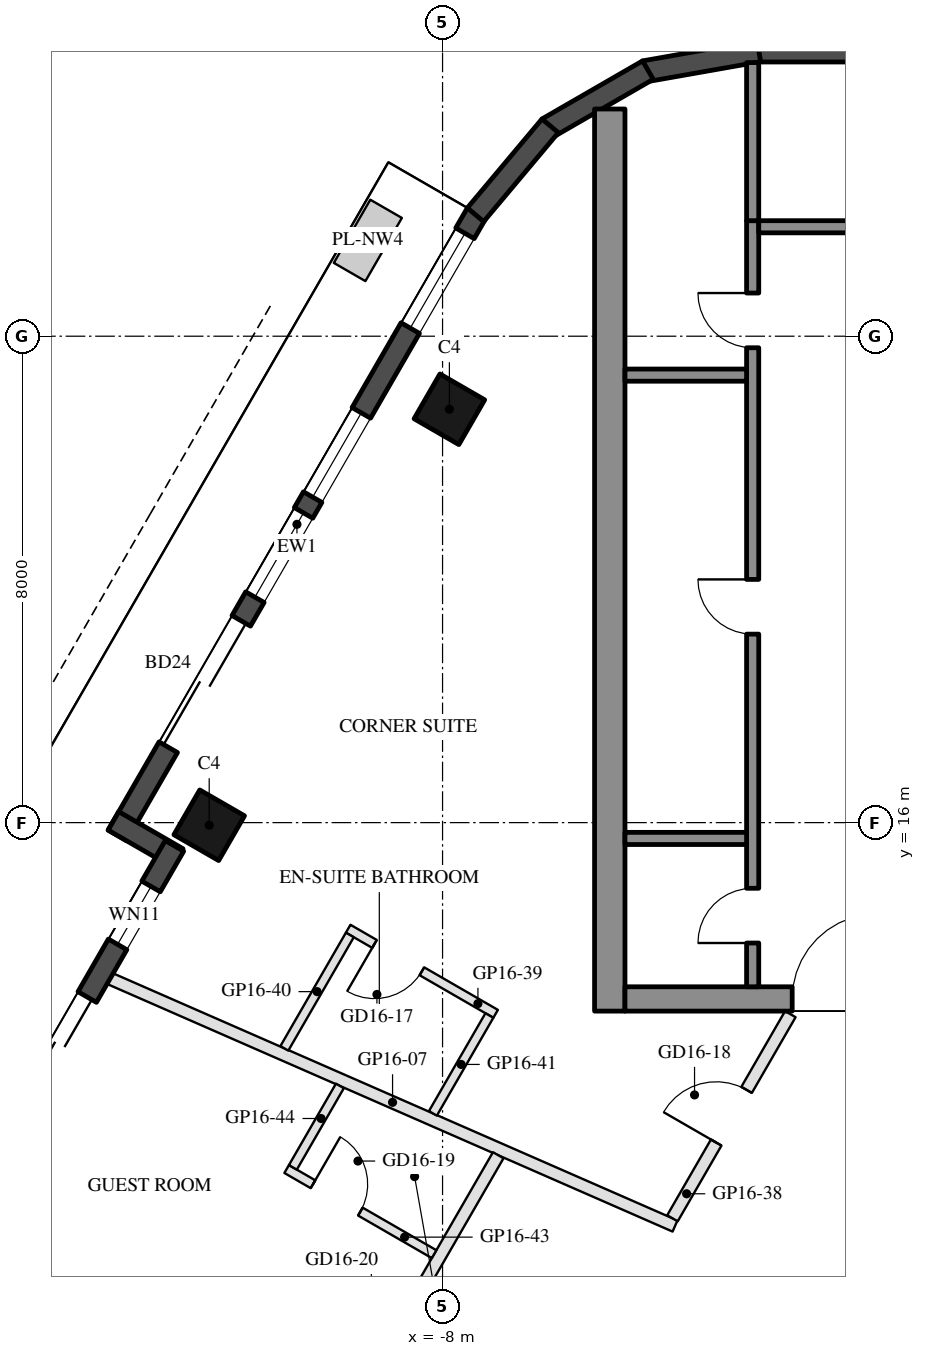
"""IFC4 building model, lengths in metres.
Left out: names, types, materials, properties, quantities, classifications, styles, units other than length and angle.
Written with IfcOpenShell. Run it as: python <this file> out.ifc"""

import sys

from ifc_helpers import new_model, si_unit, direction, frame, frame_2d, origin, origin_2d, place, context, subcontext, project, spatial, rectangle, hollow_rectangle, extrude, element, fill, save


model = new_model("IFC4")
c1 = context("Model", 3, precision=1e-05, world=origin(), true_north=direction((0.0, 1.0)))
c2 = subcontext(c1, "Body", "Model", "MODEL_VIEW")
j1 = project(units=[si_unit("LENGTHUNIT", "METRE"), si_unit("PLANEANGLEUNIT", "RADIAN")], contexts=[c1])
p1 = place(None, origin())
s1 = spatial("IfcSite", under=j1, at=p1, CompositionType="ELEMENT")
p2 = place(p1, origin())
s2 = spatial("IfcBuilding", under=s1, at=p2, CompositionType="ELEMENT")
p3 = place(p2, frame((0.0, 0.0, 176.2)))
s3 = spatial("IfcBuildingStorey", under=s2, at=p3, CompositionType="ELEMENT", Elevation=176.2)
for number, where, z_axis, x_axis in (
    (1, (-7.888, 22.798, 0.0), (0.0, 0.0, 1.0), (0.5, 0.866, 0.0)),
    (2, (-11.838, 15.957, 0.0), (0.0, 0.0, 1.0), (0.5, 0.866, 0.0)),
):
    element("IfcColumn", number, at=place(p3, frame(where, z_axis=z_axis, x_axis=x_axis)), inside=s3, PredefinedType="COLUMN", context=c2, shape_type="SweptSolid", body=[
        extrude(hollow_rectangle(XDim=0.85, YDim=0.85, WallThickness=0.04, at=origin_2d()), origin(), (0.0, 0.0, 1.0), 3.7),
    ])
p4 = place(p3, frame((-7.441, 26.022, 0.0), z_axis=(0.0, 0.0, 1.0), x_axis=(-0.499992533062, -0.86602971478, 0.0)))
e3 = element("IfcWall", 3, at=p4, inside=s3, PredefinedType="SOLIDWALL", context=c2, shape_type="SweptSolid", body=[
    extrude(rectangle(XDim=11.816, YDim=0.35, at=frame_2d((5.908, 0.0))), origin(), (0.0, 0.0, 1.0), 3.55),
])
p5 = place(p4, frame((0.381, 0.0, 0.3)))
e4 = element("IfcOpeningElement", 4, at=p5, cuts=e3, PredefinedType="OPENING", context=c2, shape_type="SweptSolid", body=[
    extrude(rectangle(XDim=1.8, YDim=2.65, at=frame_2d((0.9, 1.325))), frame((0.0, 0.185, 0.0), z_axis=(0.0, -1.0, 0.0), x_axis=(1.0, 0.0, 0.0)), (0.0, 0.0, 1.0), 0.37),
])
p6 = place(p4, frame((7.74, 0.0, 0.0)))
e5 = element("IfcOpeningElement", 5, at=p6, cuts=e3, PredefinedType="OPENING", context=c2, shape_type="SweptSolid", body=[
    extrude(rectangle(XDim=2.4, YDim=2.4, at=frame_2d((1.2, 1.2))), frame((0.0, 0.185, 0.0), z_axis=(0.0, -1.0, 0.0), x_axis=(1.0, 0.0, 0.0)), (0.0, 0.0, 1.0), 0.37),
])
p7 = place(p4, frame((3.791, 0.0, 0.3)))
e6 = element("IfcOpeningElement", 6, at=p7, cuts=e3, PredefinedType="OPENING", context=c2, shape_type="SweptSolid", body=[
    extrude(rectangle(XDim=1.6, YDim=2.65, at=frame_2d((0.8, 1.325))), frame((0.0, 0.185, 0.0), z_axis=(0.0, -1.0, 0.0), x_axis=(1.0, 0.0, 0.0)), (0.0, 0.0, 1.0), 0.37),
])
p8 = place(p4, frame((5.691, 0.0, 0.3)))
e7 = element("IfcOpeningElement", 7, at=p8, cuts=e3, PredefinedType="OPENING", context=c2, shape_type="SweptSolid", body=[
    extrude(rectangle(XDim=1.6, YDim=2.65, at=frame_2d((0.8, 1.325))), frame((0.0, 0.185, 0.0), z_axis=(0.0, -1.0, 0.0), x_axis=(1.0, 0.0, 0.0)), (0.0, 0.0, 1.0), 0.37),
])
p9 = place(p3, frame((-13.413, 16.029, 0.0), z_axis=(0.0, 0.0, 1.0), x_axis=(0.866005645448, -0.500034220881, 0.0)))
e8 = element("IfcWall", 8, at=p9, inside=s3, PredefinedType="SOLIDWALL", context=c2, shape_type="SweptSolid", body=[
    extrude(rectangle(XDim=1.22, YDim=0.35, at=frame_2d((0.61, 0.0))), origin(), (0.0, 0.0, 1.0), 3.55),
])
p10 = place(p3, frame((-12.409, 15.617, 0.0), z_axis=(0.0, 0.0, 1.0), x_axis=(-0.500003597184, -0.866023326939, 0.0)))
e9 = element("IfcWall", 9, at=p10, inside=s3, PredefinedType="SOLIDWALL", context=c2, shape_type="SweptSolid", body=[
    extrude(rectangle(XDim=6.74, YDim=0.35, at=frame_2d((3.37, 0.0))), origin(), (0.0, 0.0, 1.0), 3.55),
])
p11 = place(p10, frame((0.77, 0.0, 0.3)))
e10 = element("IfcOpeningElement", 10, at=p11, cuts=e9, PredefinedType="OPENING", context=c2, shape_type="SweptSolid", body=[
    extrude(rectangle(XDim=1.1, YDim=2.65, at=frame_2d((0.55, 1.325))), frame((0.0, 0.185, 0.0), z_axis=(0.0, -1.0, 0.0), x_axis=(1.0, 0.0, 0.0)), (0.0, 0.0, 1.0), 0.37),
])
p12 = place(p10, frame((2.87, 0.0, 0.0)))
e11 = element("IfcOpeningElement", 11, at=p12, cuts=e9, PredefinedType="OPENING", context=c2, shape_type="SweptSolid", body=[
    extrude(rectangle(XDim=1.8, YDim=2.4, at=frame_2d((0.9, 1.2))), frame((0.0, 0.185, 0.0), z_axis=(0.0, -1.0, 0.0), x_axis=(1.0, 0.0, 0.0)), (0.0, 0.0, 1.0), 0.37),
])
p13 = place(p10, frame((4.97, 0.0, 0.3)))
e12 = element("IfcOpeningElement", 12, at=p13, cuts=e9, PredefinedType="OPENING", context=c2, shape_type="SweptSolid", body=[
    extrude(rectangle(XDim=1.0, YDim=2.65, at=frame_2d((0.5, 1.325))), frame((0.0, 0.185, 0.0), z_axis=(0.0, -1.0, 0.0), x_axis=(1.0, 0.0, 0.0)), (0.0, 0.0, 1.0), 0.37),
])
p14 = place(p3, frame((2.829, 28.685, 0.0), z_axis=(0.0, 0.0, 1.0), x_axis=(-1.0, 0.0, 0.0)))
e13 = element("IfcWall", 13, at=p14, inside=s3, PredefinedType="SOLIDWALL", context=c2, shape_type="SweptSolid", body=[
    extrude(rectangle(XDim=5.658, YDim=0.35, at=frame_2d((2.829, 0.0))), origin(), (0.0, 0.0, 1.0), 3.55),
])
for number, where, z_axis, x_axis in (
    (14, (-2.799, 28.688, 0.0), (0.0, 0.0, 1.0), (-0.985, -0.174, 0.0)),
    (15, (-4.623, 28.377, 0.0), (0.0, 0.0, 1.0), (-0.866, -0.5, 0.0)),
):
    element("IfcWall", number, at=place(p3, frame(where, z_axis=z_axis, x_axis=x_axis)), inside=s3, PredefinedType="SOLIDWALL", context=c2, shape_type="SweptSolid", body=[
        extrude(rectangle(XDim=1.91, YDim=0.35, at=frame_2d((0.955, 0.0))), origin(), (0.0, 0.0, 1.0), 3.55),
    ])
p15 = place(p3, frame((-6.23, 27.461, 0.0), z_axis=(0.0, 0.0, 1.0), x_axis=(-0.642808304945, -0.766027077259, 0.0)))
e16 = element("IfcWall", 16, at=p15, inside=s3, PredefinedType="SOLIDWALL", context=c2, shape_type="SweptSolid", body=[
    extrude(rectangle(XDim=1.91, YDim=0.35, at=frame_2d((0.955, 0.0))), origin(), (0.0, 0.0, 1.0), 3.55),
])
p16 = place(p3, frame((-5.25, 12.9, 0.0), z_axis=(0.0, 0.0, 1.0), x_axis=(0.0, 1.0, 0.0)))
e17 = element("IfcWall", 17, at=p16, inside=s3, PredefinedType="SHEAR", context=c2, shape_type="SweptSolid", body=[
    extrude(rectangle(XDim=14.837, YDim=0.5, at=frame_2d((7.418, 0.0))), origin(), (0.0, 0.0, 1.0), 3.5),
])
p17 = place(p3, frame((5.0, 13.1, 0.0), z_axis=(0.0, 0.0, 1.0), x_axis=(-1.0, 0.0, 0.0)))
e18 = element("IfcWall", 18, at=p17, inside=s3, PredefinedType="SHEAR", context=c2, shape_type="SweptSolid", body=[
    extrude(rectangle(XDim=10.0, YDim=0.4, at=frame_2d((5.0, 0.0))), origin(), (0.0, 0.0, 1.0), 3.5),
])
p18 = place(p17, frame((3.55, 0.0, 0.0)))
e19 = element("IfcOpeningElement", 19, at=p18, cuts=e18, PredefinedType="OPENING", context=c2, shape_type="SweptSolid", body=[
    extrude(rectangle(XDim=1.1, YDim=2.1, at=frame_2d((0.55, 1.05))), frame((0.0, 0.21, 0.0), z_axis=(0.0, -1.0, 0.0), x_axis=(1.0, 0.0, 0.0)), (0.0, 0.0, 1.0), 0.42),
])
p19 = place(p17, frame((5.85, 0.0, 0.0)))
e20 = element("IfcOpeningElement", 20, at=p19, cuts=e18, PredefinedType="OPENING", context=c2, shape_type="SweptSolid", body=[
    extrude(rectangle(XDim=1.4, YDim=2.1, at=frame_2d((0.7, 1.05))), frame((0.0, 0.21, 0.0), z_axis=(0.0, -1.0, 0.0), x_axis=(1.0, 0.0, 0.0)), (0.0, 0.0, 1.0), 0.42),
])
p20 = place(p3, frame((-2.9, 13.3, 0.0), z_axis=(0.0, 0.0, 1.0), x_axis=(0.0, 1.0, 0.0)))
e21 = element("IfcWall", 21, at=p20, inside=s3, PredefinedType="SHEAR", context=c2, shape_type="SweptSolid", body=[
    extrude(rectangle(XDim=12.6, YDim=0.2, at=frame_2d((6.3, 0.0))), origin(), (0.0, 0.0, 1.0), 3.5),
])
p21 = place(p20, frame((0.72, 0.0, 0.0)))
e22 = element("IfcOpeningElement", 22, at=p21, cuts=e21, PredefinedType="OPENING", context=c2, shape_type="SweptSolid", body=[
    extrude(rectangle(XDim=0.9, YDim=2.1, at=frame_2d((0.45, 1.05))), frame((0.0, 0.11, 0.0), z_axis=(0.0, -1.0, 0.0), x_axis=(1.0, 0.0, 0.0)), (0.0, 0.0, 1.0), 0.22),
])
p22 = place(p20, frame((5.8, 0.0, 0.0)))
e23 = element("IfcOpeningElement", 23, at=p22, cuts=e21, PredefinedType="OPENING", context=c2, shape_type="SweptSolid", body=[
    extrude(rectangle(XDim=0.9, YDim=2.1, at=frame_2d((0.45, 1.05))), frame((0.0, 0.11, 0.0), z_axis=(0.0, -1.0, 0.0), x_axis=(1.0, 0.0, 0.0)), (0.0, 0.0, 1.0), 0.22),
])
p23 = place(p20, frame((10.51, 0.0, 0.0)))
e24 = element("IfcOpeningElement", 24, at=p23, cuts=e21, PredefinedType="OPENING", context=c2, shape_type="SweptSolid", body=[
    extrude(rectangle(XDim=0.9, YDim=2.1, at=frame_2d((0.45, 1.05))), frame((0.0, 0.11, 0.0), z_axis=(0.0, -1.0, 0.0), x_axis=(1.0, 0.0, 0.0)), (0.0, 0.0, 1.0), 0.22),
])
p24 = place(p3, frame((-0.4, 25.8, 0.0), z_axis=(0.0, 0.0, 1.0), x_axis=(-1.0, 0.0, 0.0)))
e25 = element("IfcWall", 25, at=p24, inside=s3, PredefinedType="SHEAR", context=c2, shape_type="SweptSolid", body=[
    extrude(rectangle(XDim=2.4, YDim=0.2, at=frame_2d((1.2, 0.0))), origin(), (0.0, 0.0, 1.0), 3.5),
])
for number, where, z_axis, x_axis in (
    (26, (-3.0, 15.74, 0.0), (0.0, 0.0, 1.0), (-1.0, 0.0, 0.0)),
    (27, (-3.0, 23.36, 0.0), (0.0, 0.0, 1.0), (-1.0, 0.0, 0.0)),
):
    element("IfcWall", number, at=place(p3, frame(where, z_axis=z_axis, x_axis=x_axis)), inside=s3, PredefinedType="SHEAR", context=c2, shape_type="SweptSolid", body=[
        extrude(rectangle(XDim=2.0, YDim=0.2, at=frame_2d((1.0, 0.0))), origin(), (0.0, 0.0, 1.0), 3.5),
    ])
p25 = place(p3, frame((-2.9, 25.9, 0.0), z_axis=(0.0, 0.0, 1.0), x_axis=(0.0, 1.0, 0.0)))
e28 = element("IfcWall", 28, at=p25, inside=s3, PredefinedType="SHEAR", context=c2, shape_type="SweptSolid", body=[
    extrude(rectangle(XDim=2.6, YDim=0.2, at=frame_2d((1.3, 0.0))), origin(), (0.0, 0.0, 1.0), 3.5),
])
p26 = place(p3, frame((-13.467, 13.434, 0.0), z_axis=(0.0, 0.0, 1.0), x_axis=(0.916026348045, -0.401118099426, 0.0)))
e29 = element("IfcWall", 29, at=p26, inside=s3, PredefinedType="PARTITIONING", context=c2, shape_type="SweptSolid", body=[
    extrude(rectangle(XDim=10.142, YDim=0.2, at=frame_2d((5.071, 0.0))), origin(), (0.0, 0.0, 1.0), 3.06),
])
p27 = place(p3, frame((-15.44, 8.867, 0.0), z_axis=(0.0, 0.0, 1.0), x_axis=(0.851787104886, -0.523888087237, 0.0)))
e30 = element("IfcWall", 30, at=p27, inside=s3, PredefinedType="PARTITIONING", context=c2, shape_type="SweptSolid", body=[
    extrude(rectangle(XDim=6.508, YDim=0.2, at=frame_2d((3.254, 0.0))), origin(), (0.0, 0.0, 1.0), 2.95),
])
p28 = place(p3, frame((-4.219, 9.493, 0.0), z_axis=(0.0, 0.0, 1.0), x_axis=(0.499993219391, 0.866029318535, 0.0)))
e31 = element("IfcWall", 31, at=p28, inside=s3, PredefinedType="PARTITIONING", context=c2, shape_type="SweptSolid", body=[
    extrude(rectangle(XDim=3.876, YDim=0.2, at=frame_2d((1.938, 0.0))), origin(), (0.0, 0.0, 1.0), 2.95),
])
p29 = place(p28, frame((1.438, 0.0, 0.0)))
e32 = element("IfcOpeningElement", 32, at=p29, cuts=e31, PredefinedType="OPENING", context=c2, shape_type="SweptSolid", body=[
    extrude(rectangle(XDim=1.0, YDim=2.1, at=frame_2d((0.5, 1.05))), frame((0.0, 0.11, 0.0), z_axis=(0.0, -1.0, 0.0), x_axis=(1.0, 0.0, 0.0)), (0.0, 0.0, 1.0), 0.22),
])
p30 = place(p3, frame((-7.127, 12.855, 0.0), z_axis=(0.0, 0.0, 1.0), x_axis=(-0.866018616679, 0.500011755427, 0.0)))
e33 = element("IfcWall", 33, at=p30, inside=s3, PredefinedType="PARTITIONING", context=c2, shape_type="SweptSolid", body=[
    extrude(rectangle(XDim=2.8, YDim=0.15, at=frame_2d((1.4, 0.0))), origin(), (0.0, 0.0, 1.0), 3.55),
])
p31 = place(p30, frame((1.4, 0.0, 0.0)))
e34 = element("IfcOpeningElement", 34, at=p31, cuts=e33, PredefinedType="OPENING", context=c2, shape_type="SweptSolid", body=[
    extrude(rectangle(XDim=0.9, YDim=2.1, at=frame_2d((0.45, 1.05))), frame((0.0, 0.085, 0.0), z_axis=(0.0, -1.0, 0.0), x_axis=(1.0, 0.0, 0.0)), (0.0, 0.0, 1.0), 0.17),
])
p32 = place(p3, frame((-9.525, 14.153, 0.0), z_axis=(0.0, 0.0, 1.0), x_axis=(-0.500016891966, -0.866015650984, 0.0)))
e35 = element("IfcWall", 35, at=p32, inside=s3, PredefinedType="PARTITIONING", context=c2, shape_type="SweptSolid", body=[
    extrude(rectangle(XDim=2.153, YDim=0.15, at=frame_2d((1.077, 0.0))), origin(), (0.0, 0.0, 1.0), 3.55),
])
p33 = place(p3, frame((-7.23, 12.828, 0.0), z_axis=(0.0, 0.0, 1.0), x_axis=(-0.500010545262, -0.866019315389, 0.0)))
e36 = element("IfcWall", 36, at=p33, inside=s3, PredefinedType="PARTITIONING", context=c2, shape_type="SweptSolid", body=[
    extrude(rectangle(XDim=1.858, YDim=0.15, at=frame_2d((0.929, 0.0))), origin(), (0.0, 0.0, 1.0), 3.55),
])
p34 = place(p3, frame((-9.932, 5.597, 0.0), z_axis=(0.0, 0.0, 1.0), x_axis=(0.500006916967, 0.866021410235, 0.0)))
e37 = element("IfcWall", 37, at=p34, inside=s3, PredefinedType="PARTITIONING", context=c2, shape_type="SweptSolid", body=[
    extrude(rectangle(XDim=5.696, YDim=0.2, at=frame_2d((2.848, 0.0))), origin(), (0.0, 0.0, 1.0), 2.95),
])
p35 = place(p34, frame((2.235, 0.0, 0.0)))
e38 = element("IfcOpeningElement", 38, at=p35, cuts=e37, PredefinedType="OPENING", context=c2, shape_type="SweptSolid", body=[
    extrude(rectangle(XDim=1.0, YDim=2.1, at=frame_2d((0.5, 1.05))), frame((0.0, 0.11, 0.0), z_axis=(0.0, -1.0, 0.0), x_axis=(1.0, 0.0, 0.0)), (0.0, 0.0, 1.0), 0.22),
])
p36 = place(p3, frame((-10.564, 10.303, 0.0), z_axis=(0.0, 0.0, 1.0), x_axis=(0.865996816683, -0.500049511043, 0.0)))
e39 = element("IfcWall", 39, at=p36, inside=s3, PredefinedType="PARTITIONING", context=c2, shape_type="SweptSolid", body=[
    extrude(rectangle(XDim=2.8, YDim=0.15, at=frame_2d((1.4, 0.0))), origin(), (0.0, 0.0, 1.0), 3.55),
])
p37 = place(p36, frame((0.5, 0.0, 0.0)))
e40 = element("IfcOpeningElement", 40, at=p37, cuts=e39, PredefinedType="OPENING", context=c2, shape_type="SweptSolid", body=[
    extrude(rectangle(XDim=0.9, YDim=2.1, at=frame_2d((0.45, 1.05))), frame((0.0, 0.085, 0.0), z_axis=(0.0, -1.0, 0.0), x_axis=(1.0, 0.0, 0.0)), (0.0, 0.0, 1.0), 0.17),
])
p38 = place(p3, frame((-9.688, 11.67, 0.0), z_axis=(0.0, 0.0, 1.0), x_axis=(-0.499890974144, -0.866088340742, 0.0)))
e41 = element("IfcWall", 41, at=p38, inside=s3, PredefinedType="PARTITIONING", context=c2, shape_type="SweptSolid", body=[
    extrude(rectangle(XDim=1.547, YDim=0.15, at=frame_2d((0.773, 0.0))), origin(), (0.0, 0.0, 1.0), 2.95),
])
p39 = place(p5, origin())
e42 = element("IfcWindow", 42, at=p39, inside=s3, PartitioningType="SINGLE_PANEL", PredefinedType="WINDOW", context=c2, shape_type="SweptSolid", body=[
    extrude(rectangle(XDim=1.8, YDim=2.65, at=frame_2d((0.9, 1.325))), frame((0.0, 0.03, 0.0), z_axis=(0.0, -1.0, 0.0), x_axis=(1.0, 0.0, 0.0)), (0.0, 0.0, 1.0), 0.06),
])
fill(e4, e42)
p40 = place(p6, frame((2.4, 0.0, 0.0), z_axis=(0.0, 0.0, 1.0), x_axis=(-1.0, 0.0, 0.0)))
e43 = element("IfcDoor", 43, at=p40, inside=s3, OperationType="SLIDING_TO_LEFT", PredefinedType="DOOR", context=c2, shape_type="SweptSolid", body=[
    extrude(rectangle(XDim=2.4, YDim=2.4, at=frame_2d((1.2, 1.2))), frame((0.0, 0.025, 0.0), z_axis=(0.0, -1.0, 0.0), x_axis=(1.0, 0.0, 0.0)), (0.0, 0.0, 1.0), 0.05),
])
fill(e5, e43)
p41 = place(p7, origin())
e44 = element("IfcWindow", 44, at=p41, inside=s3, PartitioningType="SINGLE_PANEL", PredefinedType="WINDOW", context=c2, shape_type="SweptSolid", body=[
    extrude(rectangle(XDim=1.6, YDim=2.65, at=frame_2d((0.8, 1.325))), frame((0.0, 0.03, 0.0), z_axis=(0.0, -1.0, 0.0), x_axis=(1.0, 0.0, 0.0)), (0.0, 0.0, 1.0), 0.06),
])
fill(e6, e44)
p42 = place(p8, origin())
e45 = element("IfcWindow", 45, at=p42, inside=s3, PartitioningType="SINGLE_PANEL", PredefinedType="WINDOW", context=c2, shape_type="SweptSolid", body=[
    extrude(rectangle(XDim=1.6, YDim=2.65, at=frame_2d((0.8, 1.325))), frame((0.0, 0.03, 0.0), z_axis=(0.0, -1.0, 0.0), x_axis=(1.0, 0.0, 0.0)), (0.0, 0.0, 1.0), 0.06),
])
fill(e7, e45)
p43 = place(p11, origin())
e46 = element("IfcWindow", 46, at=p43, inside=s3, PartitioningType="SINGLE_PANEL", PredefinedType="WINDOW", context=c2, shape_type="SweptSolid", body=[
    extrude(rectangle(XDim=1.1, YDim=2.65, at=frame_2d((0.55, 1.325))), frame((0.0, 0.03, 0.0), z_axis=(0.0, -1.0, 0.0), x_axis=(1.0, 0.0, 0.0)), (0.0, 0.0, 1.0), 0.06),
])
fill(e10, e46)
p44 = place(p12, frame((1.8, 0.0, 0.0), z_axis=(0.0, 0.0, 1.0), x_axis=(-1.0, 0.0, 0.0)))
e47 = element("IfcDoor", 47, at=p44, inside=s3, OperationType="SLIDING_TO_LEFT", PredefinedType="DOOR", context=c2, shape_type="SweptSolid", body=[
    extrude(rectangle(XDim=1.8, YDim=2.4, at=frame_2d((0.9, 1.2))), frame((0.0, 0.025, 0.0), z_axis=(0.0, -1.0, 0.0), x_axis=(1.0, 0.0, 0.0)), (0.0, 0.0, 1.0), 0.05),
])
fill(e11, e47)
p45 = place(p21, origin())
e48 = element("IfcDoor", 48, at=p45, inside=s3, OperationType="SINGLE_SWING_LEFT", PredefinedType="DOOR", context=c2, shape_type="SweptSolid", body=[
    extrude(rectangle(XDim=0.9, YDim=2.1, at=frame_2d((0.45, 1.05))), frame((0.0, 0.025, 0.0), z_axis=(0.0, -1.0, 0.0), x_axis=(1.0, 0.0, 0.0)), (0.0, 0.0, 1.0), 0.05),
])
fill(e22, e48)
p46 = place(p22, origin())
e49 = element("IfcDoor", 49, at=p46, inside=s3, OperationType="SINGLE_SWING_RIGHT", PredefinedType="DOOR", context=c2, shape_type="SweptSolid", body=[
    extrude(rectangle(XDim=0.9, YDim=2.1, at=frame_2d((0.45, 1.05))), frame((0.0, 0.025, 0.0), z_axis=(0.0, -1.0, 0.0), x_axis=(1.0, 0.0, 0.0)), (0.0, 0.0, 1.0), 0.05),
])
fill(e23, e49)
p47 = place(p23, origin())
e50 = element("IfcDoor", 50, at=p47, inside=s3, OperationType="SINGLE_SWING_RIGHT", PredefinedType="DOOR", context=c2, shape_type="SweptSolid", body=[
    extrude(rectangle(XDim=0.9, YDim=2.1, at=frame_2d((0.45, 1.05))), frame((0.0, 0.025, 0.0), z_axis=(0.0, -1.0, 0.0), x_axis=(1.0, 0.0, 0.0)), (0.0, 0.0, 1.0), 0.05),
])
fill(e24, e50)
p48 = place(p19, frame((1.4, 0.0, 0.0), z_axis=(0.0, 0.0, 1.0), x_axis=(-1.0, 0.0, 0.0)))
e51 = element("IfcDoor", 51, at=p48, inside=s3, OperationType="DOUBLE_DOOR_SINGLE_SWING", PredefinedType="DOOR", context=c2, shape_type="SweptSolid", body=[
    extrude(rectangle(XDim=1.4, YDim=2.1, at=frame_2d((0.7, 1.05))), frame((0.0, 0.025, 0.0), z_axis=(0.0, -1.0, 0.0), x_axis=(1.0, 0.0, 0.0)), (0.0, 0.0, 1.0), 0.05),
])
fill(e20, e51)
p49 = place(p31, origin())
e52 = element("IfcDoor", 52, at=p49, inside=s3, OperationType="SINGLE_SWING_RIGHT", PredefinedType="DOOR", context=c2, shape_type="SweptSolid", body=[
    extrude(rectangle(XDim=0.9, YDim=2.1, at=frame_2d((0.45, 1.05))), frame((0.0, 0.025, 0.0), z_axis=(0.0, -1.0, 0.0), x_axis=(1.0, 0.0, 0.0)), (0.0, 0.0, 1.0), 0.05),
])
fill(e34, e52)
p50 = place(p29, origin())
e53 = element("IfcDoor", 53, at=p50, inside=s3, OperationType="SINGLE_SWING_LEFT", PredefinedType="DOOR", context=c2, shape_type="SweptSolid", body=[
    extrude(rectangle(XDim=1.0, YDim=2.1, at=frame_2d((0.5, 1.05))), frame((0.0, 0.025, 0.0), z_axis=(0.0, -1.0, 0.0), x_axis=(1.0, 0.0, 0.0)), (0.0, 0.0, 1.0), 0.05),
])
fill(e32, e53)
p51 = place(p37, origin())
e54 = element("IfcDoor", 54, at=p51, inside=s3, OperationType="SINGLE_SWING_LEFT", PredefinedType="DOOR", context=c2, shape_type="SweptSolid", body=[
    extrude(rectangle(XDim=0.9, YDim=2.1, at=frame_2d((0.45, 1.05))), frame((0.0, 0.025, 0.0), z_axis=(0.0, -1.0, 0.0), x_axis=(1.0, 0.0, 0.0)), (0.0, 0.0, 1.0), 0.05),
])
fill(e40, e54)
save(model, sys.argv[1])
